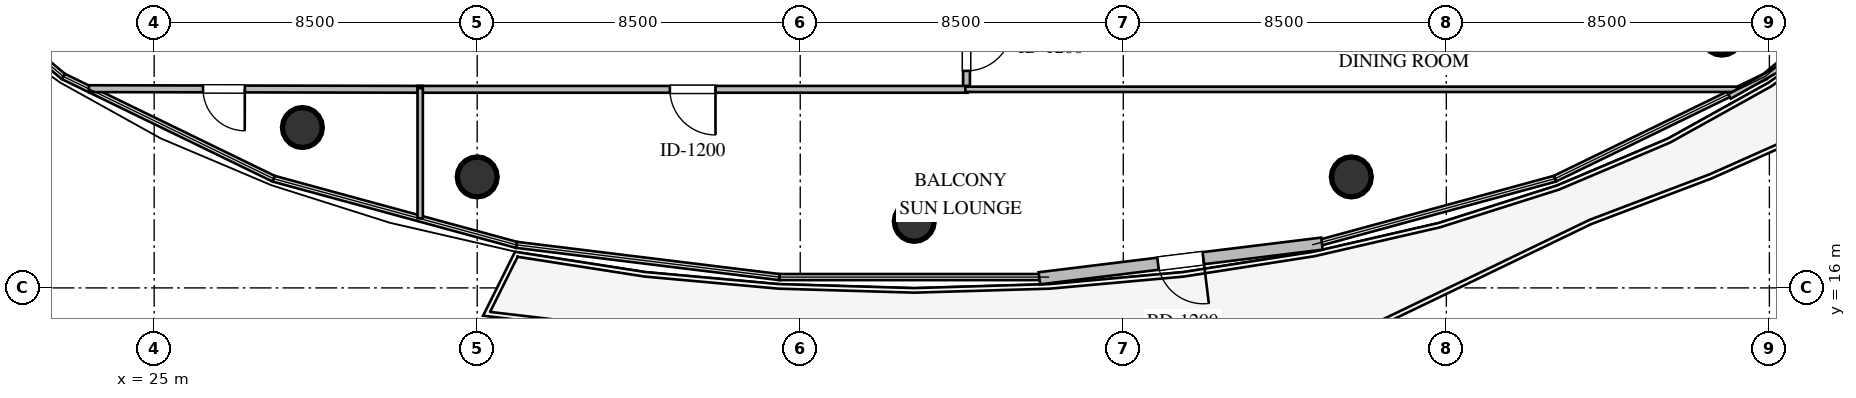
"""IFC4 building model, lengths in metres.
Left out: names, types, materials, properties, quantities, classifications, styles, units other than length and angle.
Written with IfcOpenShell. Run it as: python <this file> out.ifc"""

import sys

from ifc_helpers import new_model, si_unit, direction, frame, frame_2d, origin, origin_2d, place, context, subcontext, project, spatial, rectangle, circle, extrude, element, fill, save


model = new_model("IFC4")
c1 = context("Model", 3, precision=1e-05, world=origin(), true_north=direction((0.0, 1.0)))
c2 = subcontext(c1, "Body", "Model", "MODEL_VIEW")
j1 = project(units=[si_unit("LENGTHUNIT", "METRE"), si_unit("PLANEANGLEUNIT", "RADIAN")], contexts=[c1])
p1 = place(None, origin())
s1 = spatial("IfcSite", under=j1, at=p1, CompositionType="ELEMENT")
p2 = place(p1, origin())
s2 = spatial("IfcBuilding", under=s1, at=p2, CompositionType="ELEMENT")
p3 = place(p2, frame((0.0, 0.0, 199.2)))
s3 = spatial("IfcBuildingStorey", under=s2, at=p3, CompositionType="ELEMENT", Elevation=199.2)
for number, where, z_axis, x_axis in (
    (1, (28.9, 20.22, 0.0), (0.0, 0.0, 1.0), (1.0, 0.0, 0.0)),
    (2, (33.5, 18.92, 0.0), (0.0, 0.0, 1.0), (1.0, 0.0, 0.0)),
    (3, (45.0, 17.75, 0.0), (0.0, 0.0, 1.0), (1.0, 0.0, 0.0)),
    (4, (56.5, 18.92, 0.0), (0.0, 0.0, 1.0), (1.0, 0.0, 0.0)),
    (5, (66.25, 22.65, 0.0), (0.0, 0.0, 1.0), (1.0, 0.0, 0.0)),
):
    element("IfcColumn", number, at=place(p3, frame(where, z_axis=z_axis, x_axis=x_axis)), inside=s3, PredefinedType="COLUMN", context=c2, shape_type="SweptSolid", body=[
        extrude(circle(Radius=0.525, at=origin_2d()), origin(), (0.0, 0.0, 1.0), 3.6),
    ])
p4 = place(p3, frame((55.727, 17.165, 0.0), z_axis=(0.0, 0.0, 1.0), x_axis=(-0.992559081031, -0.121763995755, 0.0)))
e6 = element("IfcWall", 6, at=p4, inside=s3, PredefinedType="STANDARD", context=c2, shape_type="SweptSolid", body=[
    extrude(rectangle(XDim=7.491, YDim=0.32, at=frame_2d((3.745, 0.0))), origin(), (0.0, 0.0, 1.0), 3.36),
])
p5 = place(p4, frame((3.145, 0.0, 0.0)))
e7 = element("IfcOpeningElement", 7, at=p5, cuts=e6, PredefinedType="OPENING", context=c2, shape_type="SweptSolid", body=[
    extrude(rectangle(XDim=1.2, YDim=2.15, at=frame_2d((0.6, 1.075))), frame((0.0, 0.17, 0.0), z_axis=(0.0, -1.0, 0.0), x_axis=(1.0, 0.0, 0.0)), (0.0, 0.0, 1.0), 0.34),
])
p6 = place(p3, frame((46.375, 23.425, 0.0), z_axis=(0.0, 0.0, 1.0), x_axis=(0.0, -1.0, 0.0)))
e8 = element("IfcWall", 8, at=p6, inside=s3, PredefinedType="PARTITIONING", context=c2, shape_type="SweptSolid", body=[
    extrude(rectangle(XDim=2.23, YDim=0.18, at=frame_2d((1.115, 0.0))), origin(), (0.0, 0.0, 1.0), 3.36),
])
p7 = place(p6, frame((0.515, 0.0, 0.0)))
e9 = element("IfcOpeningElement", 9, at=p7, cuts=e8, PredefinedType="OPENING", context=c2, shape_type="SweptSolid", body=[
    extrude(rectangle(XDim=1.2, YDim=2.15, at=frame_2d((0.6, 1.075))), frame((0.0, 0.1, 0.0), z_axis=(0.0, -1.0, 0.0), x_axis=(1.0, 0.0, 0.0)), (0.0, 0.0, 1.0), 0.2),
])
p8 = place(p3, frame((32.065, 21.225, 0.0), z_axis=(0.0, 0.0, 1.0), x_axis=(-0.999998107366, 0.001945575683, 0.0)))
e10 = element("IfcWall", 10, at=p8, inside=s3, PredefinedType="PARTITIONING", context=c2, shape_type="SweptSolid", body=[
    extrude(rectangle(XDim=8.784, YDim=0.18, at=frame_2d((4.392, 0.0))), origin(), (0.0, 0.0, 1.0), 2.806),
])
p9 = place(p8, frame((4.679, 0.0, 0.0)))
e11 = element("IfcOpeningElement", 11, at=p9, cuts=e10, PredefinedType="OPENING", context=c2, shape_type="SweptSolid", body=[
    extrude(rectangle(XDim=1.1, YDim=2.1, at=frame_2d((0.55, 1.05))), frame((0.0, 0.1, 0.0), z_axis=(0.0, -1.0, 0.0), x_axis=(1.0, 0.0, 0.0)), (0.0, 0.0, 1.0), 0.2),
])
p10 = place(p3, frame((46.405, 21.225, 0.0), z_axis=(0.0, 0.0, 1.0), x_axis=(-1.0, 0.0, 0.0)))
e12 = element("IfcWall", 12, at=p10, inside=s3, PredefinedType="PARTITIONING", context=c2, shape_type="SweptSolid", body=[
    extrude(rectangle(XDim=14.47, YDim=0.18, at=frame_2d((7.235, 0.0))), origin(), (0.0, 0.0, 1.0), 2.996),
])
p11 = place(p10, frame((6.635, 0.0, 0.0)))
e13 = element("IfcOpeningElement", 13, at=p11, cuts=e12, PredefinedType="OPENING", context=c2, shape_type="SweptSolid", body=[
    extrude(rectangle(XDim=1.2, YDim=2.15, at=frame_2d((0.6, 1.075))), frame((0.0, 0.1, 0.0), z_axis=(0.0, -1.0, 0.0), x_axis=(1.0, 0.0, 0.0)), (0.0, 0.0, 1.0), 0.2),
])
p12 = place(p3, frame((66.684, 21.225, 0.0), z_axis=(0.0, 0.0, 1.0), x_axis=(-1.0, 0.0, 0.0)))
e14 = element("IfcWall", 14, at=p12, inside=s3, PredefinedType="PARTITIONING", context=c2, shape_type="SweptSolid", body=[
    extrude(rectangle(XDim=20.339, YDim=0.14, at=frame_2d((10.169, 0.0))), origin(), (0.0, 0.0, 1.0), 2.996),
])
p13 = place(p3, frame((67.748, 21.77, 0.0), z_axis=(0.0, 0.0, 1.0), x_axis=(-0.871352238731, -0.490658003153, 0.0)))
e15 = element("IfcWall", 15, at=p13, inside=s3, PredefinedType="PARTITIONING", context=c2, shape_type="SweptSolid", body=[
    extrude(rectangle(XDim=1.49, YDim=0.14, at=frame_2d((0.745, 0.0))), origin(), (0.0, 0.0, 1.0), 3.36),
])
p14 = place(p3, frame((32.0, 21.255, 0.0), z_axis=(0.0, 0.0, 1.0), x_axis=(0.0, -1.0, 0.0)))
e16 = element("IfcWall", 16, at=p14, inside=s3, PredefinedType="PARTITIONING", context=c2, shape_type="SweptSolid", body=[
    extrude(rectangle(XDim=3.422, YDim=0.14, at=frame_2d((1.711, 0.0))), origin(), (0.0, 0.0, 1.0), 3.36),
])
p15 = place(p5, origin())
e17 = element("IfcDoor", 17, at=p15, inside=s3, OperationType="SINGLE_SWING_LEFT", PredefinedType="DOOR", context=c2, shape_type="SweptSolid", body=[
    extrude(rectangle(XDim=1.2, YDim=2.15, at=frame_2d((0.6, 1.075))), frame((0.0, 0.025, 0.0), z_axis=(0.0, -1.0, 0.0), x_axis=(1.0, 0.0, 0.0)), (0.0, 0.0, 1.0), 0.05),
])
fill(e7, e17)
p16 = place(p7, origin())
e18 = element("IfcDoor", 18, at=p16, inside=s3, OperationType="SINGLE_SWING_LEFT", PredefinedType="DOOR", context=c2, shape_type="SweptSolid", body=[
    extrude(rectangle(XDim=1.2, YDim=2.15, at=frame_2d((0.6, 1.075))), frame((0.0, 0.025, 0.0), z_axis=(0.0, -1.0, 0.0), x_axis=(1.0, 0.0, 0.0)), (0.0, 0.0, 1.0), 0.05),
])
fill(e9, e18)
p17 = place(p9, origin())
e19 = element("IfcDoor", 19, at=p17, inside=s3, OperationType="SINGLE_SWING_LEFT", PredefinedType="DOOR", context=c2, shape_type="SweptSolid", body=[
    extrude(rectangle(XDim=1.1, YDim=2.1, at=frame_2d((0.55, 1.05))), frame((0.0, 0.025, 0.0), z_axis=(0.0, -1.0, 0.0), x_axis=(1.0, 0.0, 0.0)), (0.0, 0.0, 1.0), 0.05),
])
fill(e11, e19)
p18 = place(p11, origin())
e20 = element("IfcDoor", 20, at=p18, inside=s3, OperationType="SINGLE_SWING_LEFT", PredefinedType="DOOR", context=c2, shape_type="SweptSolid", body=[
    extrude(rectangle(XDim=1.2, YDim=2.15, at=frame_2d((0.6, 1.075))), frame((0.0, 0.025, 0.0), z_axis=(0.0, -1.0, 0.0), x_axis=(1.0, 0.0, 0.0)), (0.0, 0.0, 1.0), 0.05),
])
fill(e13, e20)
save(model, sys.argv[1])
